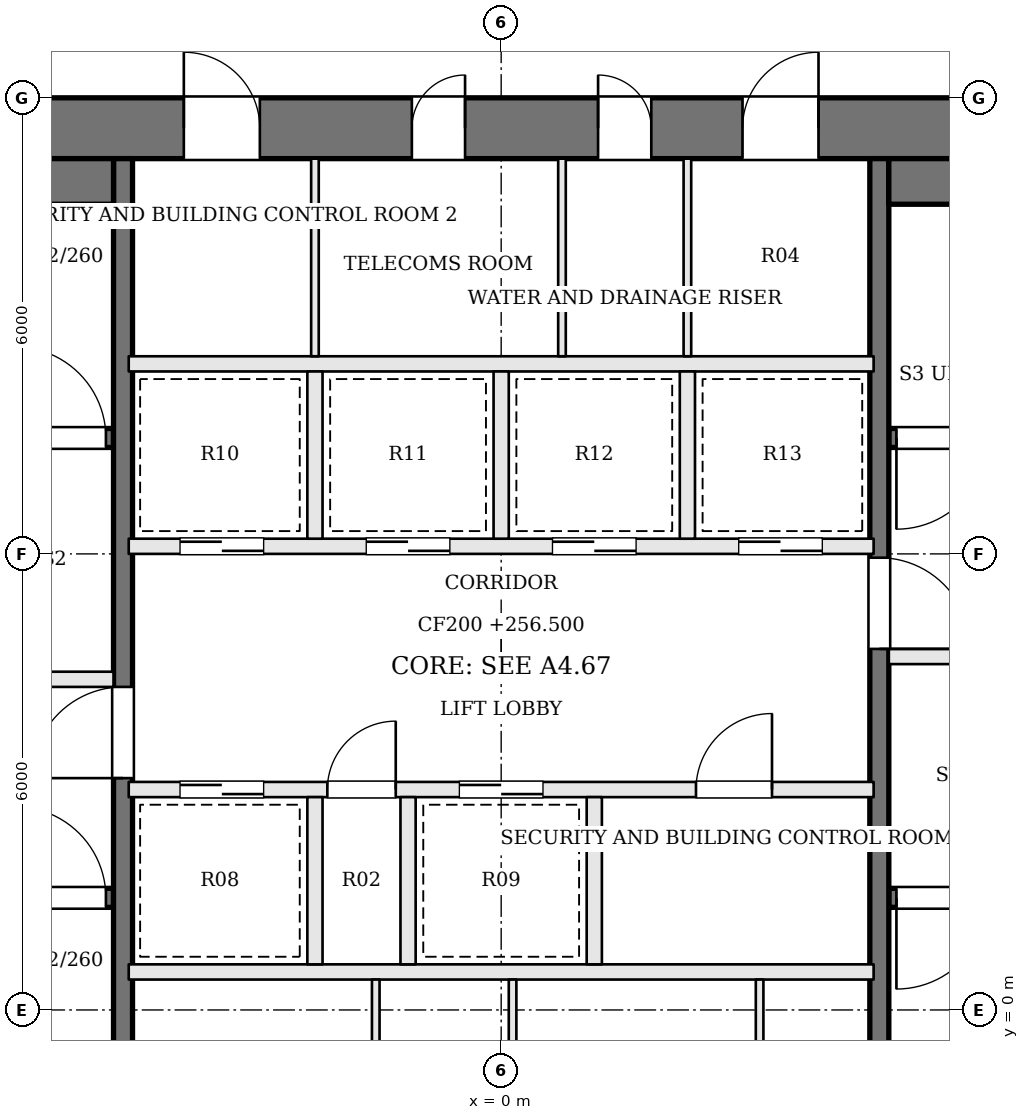
"""IFC4 building model, lengths in metres.
Left out: names, types, materials, properties, quantities, classifications, styles, units other than length and angle.
Written with IfcOpenShell. Run it as: python <this file> out.ifc"""

import sys

from ifc_helpers import new_model, si_unit, direction, frame, frame_2d, origin, place, context, subcontext, project, spatial, rectangle, extrude, element, fill, save


model = new_model("IFC4")
c1 = context("Model", 3, precision=1e-05, world=origin(), true_north=direction((0.0, 1.0)))
c2 = subcontext(c1, "Body", "Model", "MODEL_VIEW")
j1 = project(units=[si_unit("LENGTHUNIT", "METRE"), si_unit("PLANEANGLEUNIT", "RADIAN")], contexts=[c1])
p1 = place(None, origin())
s1 = spatial("IfcSite", under=j1, at=p1, CompositionType="ELEMENT")
p2 = place(p1, origin())
s2 = spatial("IfcBuilding", under=s1, at=p2, CompositionType="ELEMENT")
p3 = place(p2, frame((0.0, 0.0, 256.5)))
s3 = spatial("IfcBuildingStorey", under=s2, at=p3, CompositionType="ELEMENT", Elevation=256.5)
p4 = place(p3, frame((-13.0, 11.6, 0.0), z_axis=(0.0, 0.0, 1.0), x_axis=(1.0, 0.0, 0.0)))
e1 = element("IfcWall", 1, at=p4, inside=s3, PredefinedType="SHEAR", context=c2, shape_type="SweptSolid", body=[
    extrude(rectangle(XDim=26.0, YDim=0.8, at=frame_2d((13.0, 0.0))), origin(), (0.0, 0.0, 1.0), 3.9),
])
p5 = place(p4, frame((8.825, 0.0, 0.0)))
e2 = element("IfcOpeningElement", 2, at=p5, cuts=e1, PredefinedType="OPENING", context=c2, shape_type="SweptSolid", body=[
    extrude(rectangle(XDim=1.0, YDim=2.1, at=frame_2d((0.5, 1.05))), frame((0.0, 0.41, 0.0), z_axis=(0.0, -1.0, 0.0), x_axis=(1.0, 0.0, 0.0)), (0.0, 0.0, 1.0), 0.82),
])
p6 = place(p4, frame((11.825, 0.0, 0.0)))
e3 = element("IfcOpeningElement", 3, at=p6, cuts=e1, PredefinedType="OPENING", context=c2, shape_type="SweptSolid", body=[
    extrude(rectangle(XDim=0.7, YDim=2.1, at=frame_2d((0.35, 1.05))), frame((0.0, 0.41, 0.0), z_axis=(0.0, -1.0, 0.0), x_axis=(1.0, 0.0, 0.0)), (0.0, 0.0, 1.0), 0.82),
])
p7 = place(p4, frame((14.275, 0.0, 0.0)))
e4 = element("IfcOpeningElement", 4, at=p7, cuts=e1, PredefinedType="OPENING", context=c2, shape_type="SweptSolid", body=[
    extrude(rectangle(XDim=0.7, YDim=2.1, at=frame_2d((0.35, 1.05))), frame((0.0, 0.41, 0.0), z_axis=(0.0, -1.0, 0.0), x_axis=(1.0, 0.0, 0.0)), (0.0, 0.0, 1.0), 0.82),
])
p8 = place(p4, frame((16.175, 0.0, 0.0)))
e5 = element("IfcOpeningElement", 5, at=p8, cuts=e1, PredefinedType="OPENING", context=c2, shape_type="SweptSolid", body=[
    extrude(rectangle(XDim=1.0, YDim=2.1, at=frame_2d((0.5, 1.05))), frame((0.0, 0.41, 0.0), z_axis=(0.0, -1.0, 0.0), x_axis=(1.0, 0.0, 0.0)), (0.0, 0.0, 1.0), 0.82),
])
p9 = place(p3, frame((-12.2, 1.475, 0.0), z_axis=(0.0, 0.0, 1.0), x_axis=(1.0, 0.0, 0.0)))
e6 = element("IfcWall", 6, at=p9, inside=s3, PredefinedType="SOLIDWALL", context=c2, shape_type="SweptSolid", body=[
    extrude(rectangle(XDim=7.1, YDim=0.25, at=frame_2d((3.55, 0.0))), origin(), (0.0, 0.0, 1.0), 3.7),
])
p10 = place(p9, frame((5.8, 0.0, 0.0)))
e7 = element("IfcOpeningElement", 7, at=p10, cuts=e6, PredefinedType="OPENING", context=c2, shape_type="SweptSolid", body=[
    extrude(rectangle(XDim=1.2, YDim=2.1, at=frame_2d((0.6, 1.05))), frame((0.0, 0.135, 0.0), z_axis=(0.0, -1.0, 0.0), x_axis=(1.0, 0.0, 0.0)), (0.0, 0.0, 1.0), 0.27),
])
p11 = place(p3, frame((12.2, 7.525, 0.0), z_axis=(0.0, 0.0, 1.0), x_axis=(-1.0, 0.0, 0.0)))
e8 = element("IfcWall", 8, at=p11, inside=s3, PredefinedType="SOLIDWALL", context=c2, shape_type="SweptSolid", body=[
    extrude(rectangle(XDim=7.1, YDim=0.25, at=frame_2d((3.55, 0.0))), origin(), (0.0, 0.0, 1.0), 3.7),
])
p12 = place(p11, frame((5.8, 0.0, 0.0)))
e9 = element("IfcOpeningElement", 9, at=p12, cuts=e8, PredefinedType="OPENING", context=c2, shape_type="SweptSolid", body=[
    extrude(rectangle(XDim=1.2, YDim=2.1, at=frame_2d((0.6, 1.05))), frame((0.0, 0.135, 0.0), z_axis=(0.0, -1.0, 0.0), x_axis=(1.0, 0.0, 0.0)), (0.0, 0.0, 1.0), 0.27),
])
p13 = place(p3, frame((-12.2, 4.35, 0.0), z_axis=(0.0, 0.0, 1.0), x_axis=(1.0, 0.0, 0.0)))
e10 = element("IfcWall", 10, at=p13, inside=s3, PredefinedType="SOLIDWALL", context=c2, shape_type="SweptSolid", body=[
    extrude(rectangle(XDim=7.1, YDim=0.2, at=frame_2d((3.55, 0.0))), origin(), (0.0, 0.0, 1.0), 3.7),
])
p14 = place(p13, frame((4.4, 0.0, 0.0)))
e11 = element("IfcOpeningElement", 11, at=p14, cuts=e10, PredefinedType="OPENING", context=c2, shape_type="SweptSolid", body=[
    extrude(rectangle(XDim=1.2, YDim=2.1, at=frame_2d((0.6, 1.05))), frame((0.0, 0.11, 0.0), z_axis=(0.0, -1.0, 0.0), x_axis=(1.0, 0.0, 0.0)), (0.0, 0.0, 1.0), 0.22),
])
p15 = place(p13, frame((1.1, 0.0, 0.0)))
e12 = element("IfcOpeningElement", 12, at=p15, cuts=e10, PredefinedType="OPENING", context=c2, shape_type="SweptSolid", body=[
    extrude(rectangle(XDim=1.2, YDim=2.1, at=frame_2d((0.6, 1.05))), frame((0.0, 0.11, 0.0), z_axis=(0.0, -1.0, 0.0), x_axis=(1.0, 0.0, 0.0)), (0.0, 0.0, 1.0), 0.22),
])
p16 = place(p3, frame((12.2, 4.65, 0.0), z_axis=(0.0, 0.0, 1.0), x_axis=(-1.0, 0.0, 0.0)))
e13 = element("IfcWall", 13, at=p16, inside=s3, PredefinedType="SOLIDWALL", context=c2, shape_type="SweptSolid", body=[
    extrude(rectangle(XDim=7.1, YDim=0.2, at=frame_2d((3.55, 0.0))), origin(), (0.0, 0.0, 1.0), 3.7),
])
p17 = place(p16, frame((4.4, 0.0, 0.0)))
e14 = element("IfcOpeningElement", 14, at=p17, cuts=e13, PredefinedType="OPENING", context=c2, shape_type="SweptSolid", body=[
    extrude(rectangle(XDim=1.2, YDim=2.1, at=frame_2d((0.6, 1.05))), frame((0.0, 0.11, 0.0), z_axis=(0.0, -1.0, 0.0), x_axis=(1.0, 0.0, 0.0)), (0.0, 0.0, 1.0), 0.22),
])
p18 = place(p16, frame((1.1, 0.0, 0.0)))
e15 = element("IfcOpeningElement", 15, at=p18, cuts=e13, PredefinedType="OPENING", context=c2, shape_type="SweptSolid", body=[
    extrude(rectangle(XDim=1.2, YDim=2.1, at=frame_2d((0.6, 1.05))), frame((0.0, 0.11, 0.0), z_axis=(0.0, -1.0, 0.0), x_axis=(1.0, 0.0, 0.0)), (0.0, 0.0, 1.0), 0.22),
])
p19 = place(p3, frame((-12.2, 7.525, 0.0), z_axis=(0.0, 0.0, 1.0), x_axis=(1.0, 0.0, 0.0)))
e16 = element("IfcWall", 16, at=p19, inside=s3, PredefinedType="SOLIDWALL", context=c2, shape_type="SweptSolid", body=[
    extrude(rectangle(XDim=7.1, YDim=0.25, at=frame_2d((3.55, 0.0))), origin(), (0.0, 0.0, 1.0), 3.7),
])
p20 = place(p19, frame((5.8, 0.0, 0.0)))
e17 = element("IfcOpeningElement", 17, at=p20, cuts=e16, PredefinedType="OPENING", context=c2, shape_type="SweptSolid", body=[
    extrude(rectangle(XDim=1.2, YDim=2.1, at=frame_2d((0.6, 1.05))), frame((0.0, 0.135, 0.0), z_axis=(0.0, -1.0, 0.0), x_axis=(1.0, 0.0, 0.0)), (0.0, 0.0, 1.0), 0.27),
])
p21 = place(p3, frame((12.2, 1.475, 0.0), z_axis=(0.0, 0.0, 1.0), x_axis=(-1.0, 0.0, 0.0)))
e18 = element("IfcWall", 18, at=p21, inside=s3, PredefinedType="SOLIDWALL", context=c2, shape_type="SweptSolid", body=[
    extrude(rectangle(XDim=7.1, YDim=0.25, at=frame_2d((3.55, 0.0))), origin(), (0.0, 0.0, 1.0), 3.7),
])
p22 = place(p21, frame((5.8, 0.0, 0.0)))
e19 = element("IfcOpeningElement", 19, at=p22, cuts=e18, PredefinedType="OPENING", context=c2, shape_type="SweptSolid", body=[
    extrude(rectangle(XDim=1.2, YDim=2.1, at=frame_2d((0.6, 1.05))), frame((0.0, 0.135, 0.0), z_axis=(0.0, -1.0, 0.0), x_axis=(1.0, 0.0, 0.0)), (0.0, 0.0, 1.0), 0.27),
])
p23 = place(p3, frame((-4.975, -2.2, 0.0), z_axis=(0.0, 0.0, 1.0), x_axis=(0.0, 1.0, 0.0)))
e20 = element("IfcWall", 20, at=p23, inside=s3, PredefinedType="SOLIDWALL", context=c2, shape_type="SweptSolid", body=[
    extrude(rectangle(XDim=13.4, YDim=0.25, at=frame_2d((6.7, 0.0))), origin(), (0.0, 0.0, 1.0), 3.7),
])
p24 = place(p23, frame((5.25, 0.0, 0.0)))
e21 = element("IfcOpeningElement", 21, at=p24, cuts=e20, PredefinedType="OPENING", context=c2, shape_type="SweptSolid", body=[
    extrude(rectangle(XDim=1.2, YDim=2.1, at=frame_2d((0.6, 1.05))), frame((0.0, 0.135, 0.0), z_axis=(0.0, -1.0, 0.0), x_axis=(1.0, 0.0, 0.0)), (0.0, 0.0, 1.0), 0.27),
])
p25 = place(p3, frame((4.975, 11.2, 0.0), z_axis=(0.0, 0.0, 1.0), x_axis=(0.0, -1.0, 0.0)))
e22 = element("IfcWall", 22, at=p25, inside=s3, PredefinedType="SOLIDWALL", context=c2, shape_type="SweptSolid", body=[
    extrude(rectangle(XDim=13.4, YDim=0.25, at=frame_2d((6.7, 0.0))), origin(), (0.0, 0.0, 1.0), 3.7),
])
p26 = place(p25, frame((5.25, 0.0, 0.0)))
e23 = element("IfcOpeningElement", 23, at=p26, cuts=e22, PredefinedType="OPENING", context=c2, shape_type="SweptSolid", body=[
    extrude(rectangle(XDim=1.2, YDim=2.1, at=frame_2d((0.6, 1.05))), frame((0.0, 0.135, 0.0), z_axis=(0.0, -1.0, 0.0), x_axis=(1.0, 0.0, 0.0)), (0.0, 0.0, 1.0), 0.27),
])
for number, where, z_axis, x_axis in (
    (24, (-12.2, 10.9, 0.0), (0.0, 0.0, 1.0), (1.0, 0.0, 0.0)),
    (25, (12.2, 10.9, 0.0), (0.0, 0.0, 1.0), (-1.0, 0.0, 0.0)),
):
    element("IfcWall", number, at=place(p3, frame(where, z_axis=z_axis, x_axis=x_axis)), inside=s3, PredefinedType="SOLIDWALL", context=c2, shape_type="SweptSolid", body=[
        extrude(rectangle(XDim=7.1, YDim=0.6, at=frame_2d((3.55, 0.0))), origin(), (0.0, 0.0, 1.0), 3.7),
    ])
p27 = place(p3, frame((-4.9, 0.5, 0.0), z_axis=(0.0, 0.0, 1.0), x_axis=(1.0, 0.0, 0.0)))
e26 = element("IfcWall", 26, at=p27, inside=s3, PredefinedType="SOLIDWALL", context=c2, shape_type="SweptSolid", body=[
    extrude(rectangle(XDim=9.8, YDim=0.2, at=frame_2d((4.9, 0.0))), origin(), (0.0, 0.0, 1.0), 3.7),
])
p28 = place(p3, frame((-4.9, 2.9, 0.0), z_axis=(0.0, 0.0, 1.0), x_axis=(1.0, 0.0, 0.0)))
e27 = element("IfcWall", 27, at=p28, inside=s3, PredefinedType="SOLIDWALL", context=c2, shape_type="SweptSolid", body=[
    extrude(rectangle(XDim=9.8, YDim=0.2, at=frame_2d((4.9, 0.0))), origin(), (0.0, 0.0, 1.0), 3.7),
])
p29 = place(p28, frame((0.675, 0.0, 0.0)))
e28 = element("IfcOpeningElement", 28, at=p29, cuts=e27, PredefinedType="OPENING", context=c2, shape_type="SweptSolid", body=[
    extrude(rectangle(XDim=1.1, YDim=2.1, at=frame_2d((0.55, 1.05))), frame((0.0, 0.11, 0.0), z_axis=(0.0, -1.0, 0.0), x_axis=(1.0, 0.0, 0.0)), (0.0, 0.0, 1.0), 0.22),
])
p30 = place(p28, frame((2.613, 0.0, 0.0)))
e29 = element("IfcOpeningElement", 29, at=p30, cuts=e27, PredefinedType="OPENING", context=c2, shape_type="SweptSolid", body=[
    extrude(rectangle(XDim=0.9, YDim=2.1, at=frame_2d((0.45, 1.05))), frame((0.0, 0.11, 0.0), z_axis=(0.0, -1.0, 0.0), x_axis=(1.0, 0.0, 0.0)), (0.0, 0.0, 1.0), 0.22),
])
p31 = place(p28, frame((4.35, 0.0, 0.0)))
e30 = element("IfcOpeningElement", 30, at=p31, cuts=e27, PredefinedType="OPENING", context=c2, shape_type="SweptSolid", body=[
    extrude(rectangle(XDim=1.1, YDim=2.1, at=frame_2d((0.55, 1.05))), frame((0.0, 0.11, 0.0), z_axis=(0.0, -1.0, 0.0), x_axis=(1.0, 0.0, 0.0)), (0.0, 0.0, 1.0), 0.22),
])
p32 = place(p28, frame((7.463, 0.0, 0.0)))
e31 = element("IfcOpeningElement", 31, at=p32, cuts=e27, PredefinedType="OPENING", context=c2, shape_type="SweptSolid", body=[
    extrude(rectangle(XDim=1.0, YDim=2.1, at=frame_2d((0.5, 1.05))), frame((0.0, 0.11, 0.0), z_axis=(0.0, -1.0, 0.0), x_axis=(1.0, 0.0, 0.0)), (0.0, 0.0, 1.0), 0.22),
])
p33 = place(p3, frame((-4.9, 6.1, 0.0), z_axis=(0.0, 0.0, 1.0), x_axis=(1.0, 0.0, 0.0)))
e32 = element("IfcWall", 32, at=p33, inside=s3, PredefinedType="SOLIDWALL", context=c2, shape_type="SweptSolid", body=[
    extrude(rectangle(XDim=9.8, YDim=0.2, at=frame_2d((4.9, 0.0))), origin(), (0.0, 0.0, 1.0), 3.7),
])
p34 = place(p33, frame((0.675, 0.0, 0.0)))
e33 = element("IfcOpeningElement", 33, at=p34, cuts=e32, PredefinedType="OPENING", context=c2, shape_type="SweptSolid", body=[
    extrude(rectangle(XDim=1.1, YDim=2.1, at=frame_2d((0.55, 1.05))), frame((0.0, 0.11, 0.0), z_axis=(0.0, -1.0, 0.0), x_axis=(1.0, 0.0, 0.0)), (0.0, 0.0, 1.0), 0.22),
])
p35 = place(p33, frame((3.125, 0.0, 0.0)))
e34 = element("IfcOpeningElement", 34, at=p35, cuts=e32, PredefinedType="OPENING", context=c2, shape_type="SweptSolid", body=[
    extrude(rectangle(XDim=1.1, YDim=2.1, at=frame_2d((0.55, 1.05))), frame((0.0, 0.11, 0.0), z_axis=(0.0, -1.0, 0.0), x_axis=(1.0, 0.0, 0.0)), (0.0, 0.0, 1.0), 0.22),
])
p36 = place(p33, frame((5.575, 0.0, 0.0)))
e35 = element("IfcOpeningElement", 35, at=p36, cuts=e32, PredefinedType="OPENING", context=c2, shape_type="SweptSolid", body=[
    extrude(rectangle(XDim=1.1, YDim=2.1, at=frame_2d((0.55, 1.05))), frame((0.0, 0.11, 0.0), z_axis=(0.0, -1.0, 0.0), x_axis=(1.0, 0.0, 0.0)), (0.0, 0.0, 1.0), 0.22),
])
p37 = place(p33, frame((8.025, 0.0, 0.0)))
e36 = element("IfcOpeningElement", 36, at=p37, cuts=e32, PredefinedType="OPENING", context=c2, shape_type="SweptSolid", body=[
    extrude(rectangle(XDim=1.1, YDim=2.1, at=frame_2d((0.55, 1.05))), frame((0.0, 0.11, 0.0), z_axis=(0.0, -1.0, 0.0), x_axis=(1.0, 0.0, 0.0)), (0.0, 0.0, 1.0), 0.22),
])
p38 = place(p3, frame((-4.9, 8.5, 0.0), z_axis=(0.0, 0.0, 1.0), x_axis=(1.0, 0.0, 0.0)))
e37 = element("IfcWall", 37, at=p38, inside=s3, PredefinedType="SOLIDWALL", context=c2, shape_type="SweptSolid", body=[
    extrude(rectangle(XDim=9.8, YDim=0.2, at=frame_2d((4.9, 0.0))), origin(), (0.0, 0.0, 1.0), 3.7),
])
for number, where, z_axis, x_axis in (
    (38, (-2.45, 0.6, 0.0), (0.0, 0.0, 1.0), (0.0, 1.0, 0.0)),
    (39, (-1.225, 0.6, 0.0), (0.0, 0.0, 1.0), (0.0, 1.0, 0.0)),
    (40, (1.225, 0.6, 0.0), (0.0, 0.0, 1.0), (0.0, 1.0, 0.0)),
    (41, (-2.45, 6.2, 0.0), (0.0, 0.0, 1.0), (0.0, 1.0, 0.0)),
    (42, (0.0, 6.2, 0.0), (0.0, 0.0, 1.0), (0.0, 1.0, 0.0)),
    (43, (2.45, 6.2, 0.0), (0.0, 0.0, 1.0), (0.0, 1.0, 0.0)),
):
    element("IfcWall", number, at=place(p3, frame(where, z_axis=z_axis, x_axis=x_axis)), inside=s3, PredefinedType="SOLIDWALL", context=c2, shape_type="SweptSolid", body=[
        extrude(rectangle(XDim=2.2, YDim=0.2, at=frame_2d((1.1, 0.0))), origin(), (0.0, 0.0, 1.0), 3.7),
    ])
for number, where, z_axis, x_axis in (
    (44, (-1.65, -2.2, 0.0), (0.0, 0.0, 1.0), (0.0, 1.0, 0.0)),
    (45, (0.15, -2.2, 0.0), (0.0, 0.0, 1.0), (0.0, 1.0, 0.0)),
    (46, (3.4, -2.2, 0.0), (0.0, 0.0, 1.0), (0.0, 1.0, 0.0)),
    (47, (-2.45, 8.6, 0.0), (0.0, 0.0, 1.0), (0.0, 1.0, 0.0)),
    (48, (0.8, 8.6, 0.0), (0.0, 0.0, 1.0), (0.0, 1.0, 0.0)),
    (49, (2.45, 8.6, 0.0), (0.0, 0.0, 1.0), (0.0, 1.0, 0.0)),
):
    element("IfcWall", number, at=place(p3, frame(where, z_axis=z_axis, x_axis=x_axis)), inside=s3, PredefinedType="PARTITIONING", context=c2, shape_type="SweptSolid", body=[
        extrude(rectangle(XDim=2.6, YDim=0.1, at=frame_2d((1.3, 0.0))), origin(), (0.0, 0.0, 1.0), 3.7),
    ])
p39 = place(p24, origin())
e50 = element("IfcDoor", 50, at=p39, inside=s3, OperationType="SINGLE_SWING_LEFT", PredefinedType="DOOR", context=c2, shape_type="SweptSolid", body=[
    extrude(rectangle(XDim=1.2, YDim=2.1, at=frame_2d((0.6, 1.05))), frame((0.0, 0.025, 0.0), z_axis=(0.0, -1.0, 0.0), x_axis=(1.0, 0.0, 0.0)), (0.0, 0.0, 1.0), 0.05),
])
fill(e21, e50)
p40 = place(p26, origin())
e51 = element("IfcDoor", 51, at=p40, inside=s3, OperationType="SINGLE_SWING_RIGHT", PredefinedType="DOOR", context=c2, shape_type="SweptSolid", body=[
    extrude(rectangle(XDim=1.2, YDim=2.1, at=frame_2d((0.6, 1.05))), frame((0.0, 0.025, 0.0), z_axis=(0.0, -1.0, 0.0), x_axis=(1.0, 0.0, 0.0)), (0.0, 0.0, 1.0), 0.05),
])
fill(e23, e51)
p41 = place(p10, origin())
e52 = element("IfcDoor", 52, at=p41, inside=s3, OperationType="SINGLE_SWING_LEFT", PredefinedType="DOOR", context=c2, shape_type="SweptSolid", body=[
    extrude(rectangle(XDim=1.2, YDim=2.1, at=frame_2d((0.6, 1.05))), frame((0.0, 0.025, 0.0), z_axis=(0.0, -1.0, 0.0), x_axis=(1.0, 0.0, 0.0)), (0.0, 0.0, 1.0), 0.05),
])
fill(e7, e52)
p42 = place(p12, origin())
e53 = element("IfcDoor", 53, at=p42, inside=s3, OperationType="SINGLE_SWING_RIGHT", PredefinedType="DOOR", context=c2, shape_type="SweptSolid", body=[
    extrude(rectangle(XDim=1.2, YDim=2.1, at=frame_2d((0.6, 1.05))), frame((0.0, 0.025, 0.0), z_axis=(0.0, -1.0, 0.0), x_axis=(1.0, 0.0, 0.0)), (0.0, 0.0, 1.0), 0.05),
])
fill(e9, e53)
p43 = place(p20, origin())
e54 = element("IfcDoor", 54, at=p43, inside=s3, OperationType="SINGLE_SWING_LEFT", PredefinedType="DOOR", context=c2, shape_type="SweptSolid", body=[
    extrude(rectangle(XDim=1.2, YDim=2.1, at=frame_2d((0.6, 1.05))), frame((0.0, 0.025, 0.0), z_axis=(0.0, -1.0, 0.0), x_axis=(1.0, 0.0, 0.0)), (0.0, 0.0, 1.0), 0.05),
])
fill(e17, e54)
p44 = place(p22, origin())
e55 = element("IfcDoor", 55, at=p44, inside=s3, OperationType="SINGLE_SWING_RIGHT", PredefinedType="DOOR", context=c2, shape_type="SweptSolid", body=[
    extrude(rectangle(XDim=1.2, YDim=2.1, at=frame_2d((0.6, 1.05))), frame((0.0, 0.025, 0.0), z_axis=(0.0, -1.0, 0.0), x_axis=(1.0, 0.0, 0.0)), (0.0, 0.0, 1.0), 0.05),
])
fill(e19, e55)
p45 = place(p29, origin())
e56 = element("IfcDoor", 56, at=p45, inside=s3, OperationType="SLIDING_TO_RIGHT", PredefinedType="DOOR", context=c2, shape_type="SweptSolid", body=[
    extrude(rectangle(XDim=1.1, YDim=2.1, at=frame_2d((0.55, 1.05))), frame((0.0, 0.025, 0.0), z_axis=(0.0, -1.0, 0.0), x_axis=(1.0, 0.0, 0.0)), (0.0, 0.0, 1.0), 0.05),
])
fill(e28, e56)
p46 = place(p30, origin())
e57 = element("IfcDoor", 57, at=p46, inside=s3, OperationType="SINGLE_SWING_RIGHT", PredefinedType="DOOR", context=c2, shape_type="SweptSolid", body=[
    extrude(rectangle(XDim=0.9, YDim=2.1, at=frame_2d((0.45, 1.05))), frame((0.0, 0.025, 0.0), z_axis=(0.0, -1.0, 0.0), x_axis=(1.0, 0.0, 0.0)), (0.0, 0.0, 1.0), 0.05),
])
fill(e29, e57)
p47 = place(p31, origin())
e58 = element("IfcDoor", 58, at=p47, inside=s3, OperationType="SLIDING_TO_LEFT", PredefinedType="DOOR", context=c2, shape_type="SweptSolid", body=[
    extrude(rectangle(XDim=1.1, YDim=2.1, at=frame_2d((0.55, 1.05))), frame((0.0, 0.025, 0.0), z_axis=(0.0, -1.0, 0.0), x_axis=(1.0, 0.0, 0.0)), (0.0, 0.0, 1.0), 0.05),
])
fill(e30, e58)
p48 = place(p32, origin())
e59 = element("IfcDoor", 59, at=p48, inside=s3, OperationType="SINGLE_SWING_RIGHT", PredefinedType="DOOR", context=c2, shape_type="SweptSolid", body=[
    extrude(rectangle(XDim=1.0, YDim=2.1, at=frame_2d((0.5, 1.05))), frame((0.0, 0.025, 0.0), z_axis=(0.0, -1.0, 0.0), x_axis=(1.0, 0.0, 0.0)), (0.0, 0.0, 1.0), 0.05),
])
fill(e31, e59)
p49 = place(p34, origin())
e60 = element("IfcDoor", 60, at=p49, inside=s3, OperationType="SLIDING_TO_RIGHT", PredefinedType="DOOR", context=c2, shape_type="SweptSolid", body=[
    extrude(rectangle(XDim=1.1, YDim=2.1, at=frame_2d((0.55, 1.05))), frame((0.0, 0.025, 0.0), z_axis=(0.0, -1.0, 0.0), x_axis=(1.0, 0.0, 0.0)), (0.0, 0.0, 1.0), 0.05),
])
fill(e33, e60)
p50 = place(p35, origin())
e61 = element("IfcDoor", 61, at=p50, inside=s3, OperationType="SLIDING_TO_LEFT", PredefinedType="DOOR", context=c2, shape_type="SweptSolid", body=[
    extrude(rectangle(XDim=1.1, YDim=2.1, at=frame_2d((0.55, 1.05))), frame((0.0, 0.025, 0.0), z_axis=(0.0, -1.0, 0.0), x_axis=(1.0, 0.0, 0.0)), (0.0, 0.0, 1.0), 0.05),
])
fill(e34, e61)
p51 = place(p36, origin())
e62 = element("IfcDoor", 62, at=p51, inside=s3, OperationType="SLIDING_TO_RIGHT", PredefinedType="DOOR", context=c2, shape_type="SweptSolid", body=[
    extrude(rectangle(XDim=1.1, YDim=2.1, at=frame_2d((0.55, 1.05))), frame((0.0, 0.025, 0.0), z_axis=(0.0, -1.0, 0.0), x_axis=(1.0, 0.0, 0.0)), (0.0, 0.0, 1.0), 0.05),
])
fill(e35, e62)
p52 = place(p37, origin())
e63 = element("IfcDoor", 63, at=p52, inside=s3, OperationType="SLIDING_TO_LEFT", PredefinedType="DOOR", context=c2, shape_type="SweptSolid", body=[
    extrude(rectangle(XDim=1.1, YDim=2.1, at=frame_2d((0.55, 1.05))), frame((0.0, 0.025, 0.0), z_axis=(0.0, -1.0, 0.0), x_axis=(1.0, 0.0, 0.0)), (0.0, 0.0, 1.0), 0.05),
])
fill(e36, e63)
p53 = place(p5, origin())
e64 = element("IfcDoor", 64, at=p53, inside=s3, OperationType="SINGLE_SWING_LEFT", PredefinedType="DOOR", context=c2, shape_type="SweptSolid", body=[
    extrude(rectangle(XDim=1.0, YDim=2.1, at=frame_2d((0.5, 1.05))), frame((0.0, 0.025, 0.0), z_axis=(0.0, -1.0, 0.0), x_axis=(1.0, 0.0, 0.0)), (0.0, 0.0, 1.0), 0.05),
])
fill(e2, e64)
p54 = place(p6, origin())
e65 = element("IfcDoor", 65, at=p54, inside=s3, OperationType="SINGLE_SWING_RIGHT", PredefinedType="DOOR", context=c2, shape_type="SweptSolid", body=[
    extrude(rectangle(XDim=0.7, YDim=2.1, at=frame_2d((0.35, 1.05))), frame((0.0, 0.025, 0.0), z_axis=(0.0, -1.0, 0.0), x_axis=(1.0, 0.0, 0.0)), (0.0, 0.0, 1.0), 0.05),
])
fill(e3, e65)
p55 = place(p7, origin())
e66 = element("IfcDoor", 66, at=p55, inside=s3, OperationType="SINGLE_SWING_LEFT", PredefinedType="DOOR", context=c2, shape_type="SweptSolid", body=[
    extrude(rectangle(XDim=0.7, YDim=2.1, at=frame_2d((0.35, 1.05))), frame((0.0, 0.025, 0.0), z_axis=(0.0, -1.0, 0.0), x_axis=(1.0, 0.0, 0.0)), (0.0, 0.0, 1.0), 0.05),
])
fill(e4, e66)
p56 = place(p8, origin())
e67 = element("IfcDoor", 67, at=p56, inside=s3, OperationType="SINGLE_SWING_RIGHT", PredefinedType="DOOR", context=c2, shape_type="SweptSolid", body=[
    extrude(rectangle(XDim=1.0, YDim=2.1, at=frame_2d((0.5, 1.05))), frame((0.0, 0.025, 0.0), z_axis=(0.0, -1.0, 0.0), x_axis=(1.0, 0.0, 0.0)), (0.0, 0.0, 1.0), 0.05),
])
fill(e5, e67)
save(model, sys.argv[1])
